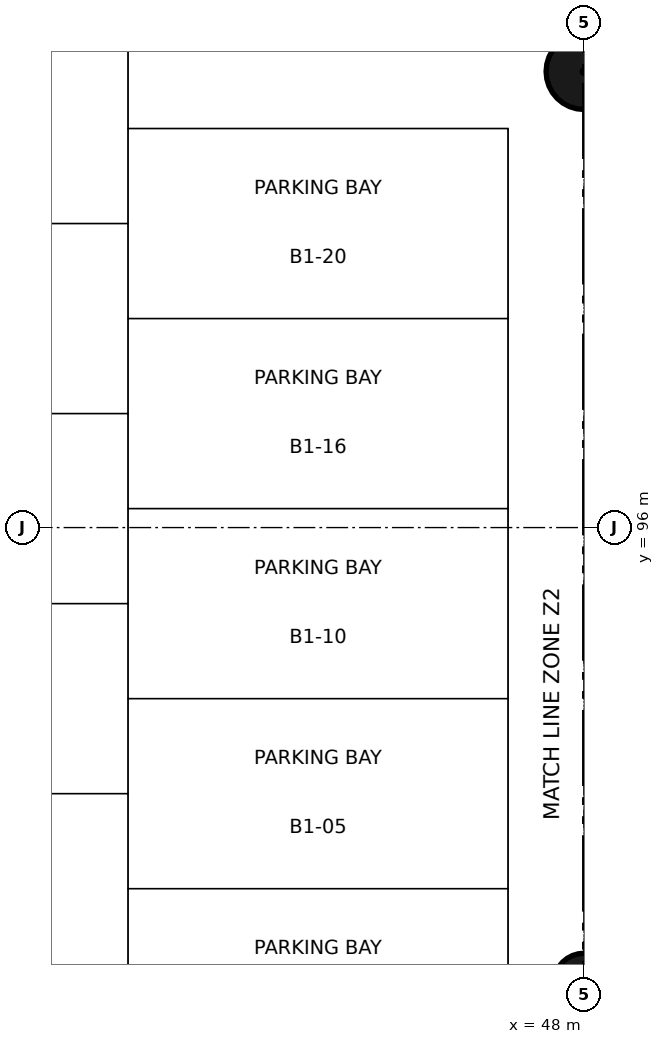
"""IFC4 building model, lengths in metres.
Left out: names, types, materials, properties, quantities, classifications, styles, units other than length and angle.
Written with IfcOpenShell. Run it as: python <this file> out.ifc"""

import sys

from ifc_helpers import new_model, si_unit, direction, frame, origin, origin_2d, place, context, subcontext, project, spatial, circle, extrude, element, save


model = new_model("IFC4")
c1 = context("Model", 3, precision=1e-05, world=origin(), true_north=direction((0.0, 1.0)))
c2 = subcontext(c1, "Body", "Model", "MODEL_VIEW")
j1 = project(units=[si_unit("LENGTHUNIT", "METRE"), si_unit("PLANEANGLEUNIT", "RADIAN")], contexts=[c1])
p1 = place(None, origin())
s1 = spatial("IfcSite", under=j1, at=p1, CompositionType="ELEMENT")
p2 = place(p1, origin())
s2 = spatial("IfcBuilding", under=s1, at=p2, CompositionType="ELEMENT")
p3 = place(p2, frame((0.0, 0.0, -4.2)))
s3 = spatial("IfcBuildingStorey", under=s2, at=p3, CompositionType="ELEMENT", Elevation=-4.2)
p4 = place(p3, frame((48.0, 102.0, -0.6), z_axis=(0.0, 0.0, 1.0), x_axis=(1.0, 0.0, 0.0)))
e1 = element("IfcColumn", 1, at=p4, inside=s3, PredefinedType="COLUMN", context=c2, shape_type="SweptSolid", body=[
    extrude(circle(Radius=0.5, at=origin_2d()), origin(), (0.0, 0.0, 1.0), 4.8),
])
p5 = place(p3, frame((48.0, 90.0, -0.6), z_axis=(0.0, 0.0, 1.0), x_axis=(1.0, 0.0, 0.0)))
e2 = element("IfcColumn", 2, at=p5, inside=s3, PredefinedType="COLUMN", context=c2, shape_type="SweptSolid", body=[
    extrude(circle(Radius=0.4, at=origin_2d()), origin(), (0.0, 0.0, 1.0), 4.35),
])
save(model, sys.argv[1])
